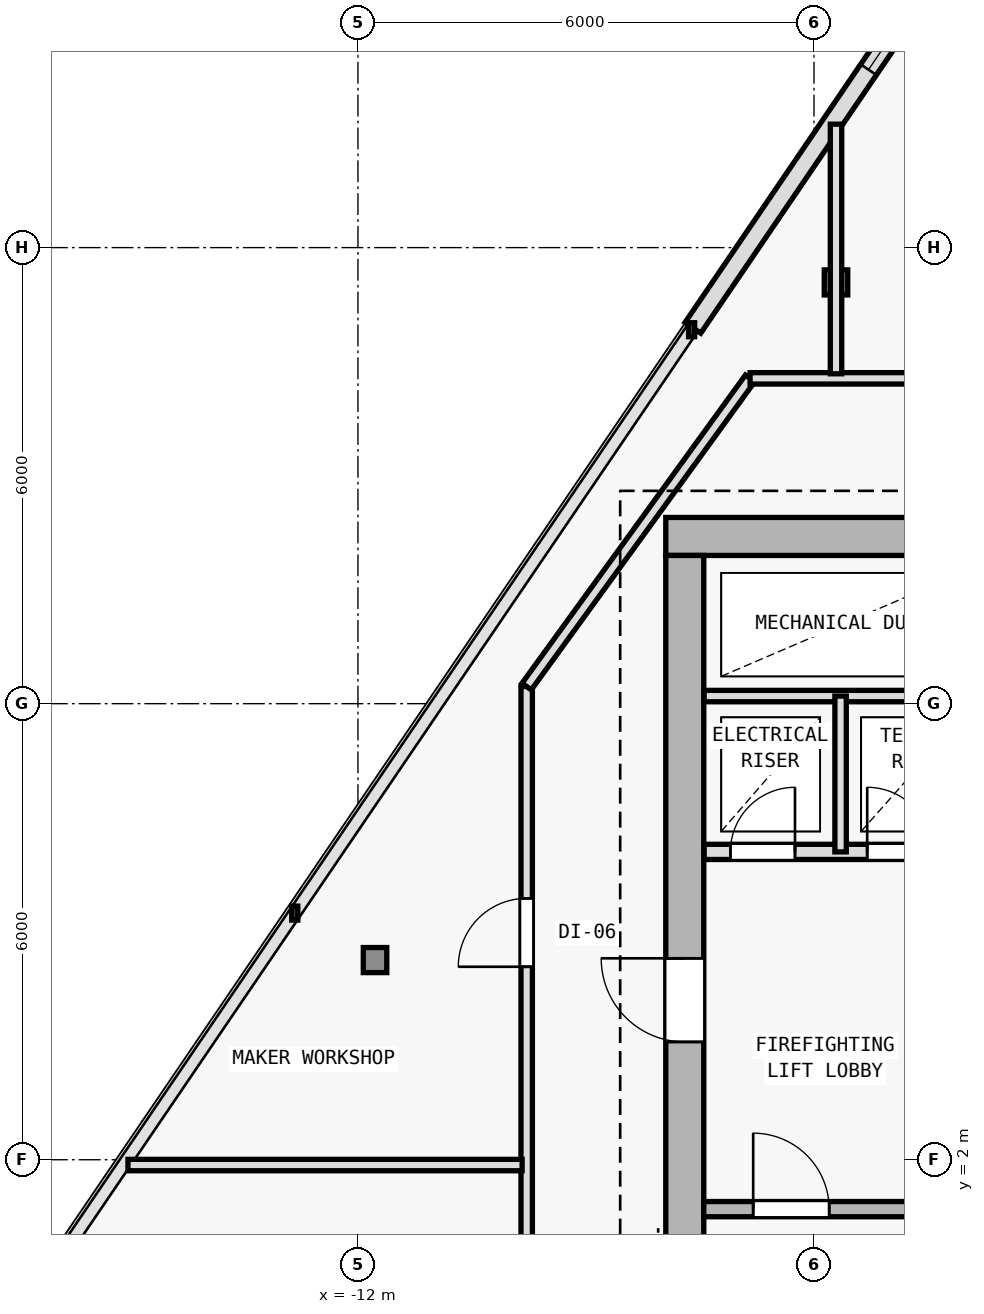
"""IFC4 building model, lengths in metres.
Left out: names, types, materials, properties, quantities, classifications, styles, units other than length and angle.
Written with IfcOpenShell. Run it as: python <this file> out.ifc"""

import sys

from ifc_helpers import new_model, si_unit, direction, frame, frame_2d, origin, origin_2d, place, context, subcontext, project, spatial, rectangle, i_section, extrude, element, fill, save


model = new_model("IFC4")
c1 = context("Model", 3, precision=1e-05, world=origin(), true_north=direction((0.0, 1.0)))
c2 = subcontext(c1, "Body", "Model", "MODEL_VIEW")
j1 = project(units=[si_unit("LENGTHUNIT", "METRE"), si_unit("PLANEANGLEUNIT", "RADIAN")], contexts=[c1])
p1 = place(None, origin())
s1 = spatial("IfcSite", under=j1, at=p1, CompositionType="ELEMENT")
p2 = place(p1, origin())
s2 = spatial("IfcBuilding", under=s1, at=p2, CompositionType="ELEMENT")
p3 = place(p2, frame((0.0, 0.0, 294.0)))
s3 = spatial("IfcBuildingStorey", under=s2, at=p3, CompositionType="ELEMENT", Elevation=294.0)
for number, where, z_axis, x_axis in (
    (1, (-7.7, 10.2, 0.0), (0.0, 0.0, 1.0), (1.0, 0.0, 0.0)),
    (2, (-7.7, 2.0, 0.0), (0.0, 0.0, 1.0), (1.0, 0.0, 0.0)),
):
    element("IfcColumn", number, at=place(p3, frame(where, z_axis=z_axis, x_axis=x_axis)), inside=s3, PredefinedType="COLUMN", context=c2, shape_type="SweptSolid", body=[
        extrude(i_section(OverallWidth=0.374, OverallDepth=0.372, WebThickness=0.012, FlangeThickness=0.02, FilletRadius=0.015, at=origin_2d()), origin(), (0.0, 0.0, 1.0), 3.6),
    ])
for number, where, z_axis, x_axis in (
    (3, (-5.71, 13.542, 0.006), (0.0, 0.0, 1.0), (1.0, 0.0, 0.0)),
    (4, (-11.775, 4.627, 0.006), (0.0, 0.0, 1.0), (1.0, 0.0, 0.0)),
):
    element("IfcColumn", number, at=place(p3, frame(where, z_axis=z_axis, x_axis=x_axis)), inside=s3, PredefinedType="COLUMN", context=c2, shape_type="SweptSolid", body=[
        extrude(i_section(OverallWidth=0.309, OverallDepth=0.33, WebThickness=0.011, FlangeThickness=0.019, FilletRadius=0.027, at=origin_2d()), origin(), (0.0, 0.0, 1.0), 3.594),
    ])
p4 = place(p3, frame((-7.593, 12.945, 0.0), z_axis=(0.0, 0.0, 1.0), x_axis=(0.562476003565, 0.826813609838, 0.0)))
e5 = element("IfcWall", 5, at=p4, inside=s3, PredefinedType="SOLIDWALL", context=c2, shape_type="SweptSolid", body=[
    extrude(rectangle(XDim=9.816, YDim=0.25, at=frame_2d((4.908, 0.0))), origin(), (0.0, 0.0, 1.0), 3.34),
])
p5 = place(p4, frame((4.108, 0.0, 0.62)))
e6 = element("IfcOpeningElement", 6, at=p5, cuts=e5, PredefinedType="OPENING", context=c2, shape_type="SweptSolid", body=[
    extrude(rectangle(XDim=1.6, YDim=2.1, at=frame_2d((0.8, 1.05))), frame((0.0, 0.135, 0.0), z_axis=(0.0, -1.0, 0.0), x_axis=(1.0, 0.0, 0.0)), (0.0, 0.0, 1.0), 0.27),
])
p6 = place(p3, frame((7.95, 10.2, 0.0), z_axis=(0.0, 0.0, 1.0), x_axis=(-1.0, 0.0, 0.0)))
e7 = element("IfcWall", 7, at=p6, inside=s3, PredefinedType="SHEAR", context=c2, shape_type="SweptSolid", body=[
    extrude(rectangle(XDim=15.9, YDim=0.5, at=frame_2d((7.95, 0.0))), origin(), (0.0, 0.0, 1.0), 3.34),
])
p7 = place(p6, frame((4.4, 0.0, 0.0)))
e8 = element("IfcOpeningElement", 8, at=p7, cuts=e7, PredefinedType="OPENING", context=c2, shape_type="SweptSolid", body=[
    extrude(rectangle(XDim=1.1, YDim=2.15, at=frame_2d((0.55, 1.075))), frame((0.0, 0.26, 0.0), z_axis=(0.0, -1.0, 0.0), x_axis=(1.0, 0.0, 0.0)), (0.0, 0.0, 1.0), 0.52),
])
p8 = place(p3, frame((-7.7, -9.15, 0.0), z_axis=(0.0, 0.0, 1.0), x_axis=(0.0, 1.0, 0.0)))
e9 = element("IfcWall", 9, at=p8, inside=s3, PredefinedType="SHEAR", context=c2, shape_type="SweptSolid", body=[
    extrude(rectangle(XDim=19.1, YDim=0.5, at=frame_2d((9.55, 0.0))), origin(), (0.0, 0.0, 1.0), 3.34),
])
p9 = place(p8, frame((12.7, 0.0, 0.0)))
e10 = element("IfcOpeningElement", 10, at=p9, cuts=e9, PredefinedType="OPENING", context=c2, shape_type="SweptSolid", body=[
    extrude(rectangle(XDim=1.1, YDim=2.15, at=frame_2d((0.55, 1.075))), frame((0.0, 0.26, 0.0), z_axis=(0.0, -1.0, 0.0), x_axis=(1.0, 0.0, 0.0)), (0.0, 0.0, 1.0), 0.52),
])
p10 = place(p3, frame((-7.45, 1.35, 0.0), z_axis=(0.0, 0.0, 1.0), x_axis=(1.0, 0.0, 0.0)))
e11 = element("IfcWall", 11, at=p10, inside=s3, PredefinedType="SOLIDWALL", context=c2, shape_type="SweptSolid", body=[
    extrude(rectangle(XDim=3.4, YDim=0.2, at=frame_2d((1.7, 0.0))), origin(), (0.0, 0.0, 1.0), 3.34),
])
p11 = place(p10, frame((0.65, 0.0, 0.0)))
e12 = element("IfcOpeningElement", 12, at=p11, cuts=e11, PredefinedType="OPENING", context=c2, shape_type="SweptSolid", body=[
    extrude(rectangle(XDim=1.0, YDim=2.15, at=frame_2d((0.5, 1.075))), frame((0.0, 0.11, 0.0), z_axis=(0.0, -1.0, 0.0), x_axis=(1.0, 0.0, 0.0)), (0.0, 0.0, 1.0), 0.22),
])
p12 = place(p3, frame((-7.445, 6.05, 0.0), z_axis=(0.0, 0.0, 1.0), x_axis=(1.0, 0.0, 0.0)))
e13 = element("IfcWall", 13, at=p12, inside=s3, PredefinedType="SOLIDWALL", context=c2, shape_type="SweptSolid", body=[
    extrude(rectangle(XDim=3.595, YDim=0.2, at=frame_2d((1.797, 0.0))), origin(), (0.0, 0.0, 1.0), 3.34),
])
p13 = place(p12, frame((0.345, 0.0, 0.0)))
e14 = element("IfcOpeningElement", 14, at=p13, cuts=e13, PredefinedType="OPENING", context=c2, shape_type="SweptSolid", body=[
    extrude(rectangle(XDim=0.85, YDim=2.1, at=frame_2d((0.425, 1.05))), frame((0.0, 0.11, 0.0), z_axis=(0.0, -1.0, 0.0), x_axis=(1.0, 0.0, 0.0)), (0.0, 0.0, 1.0), 0.22),
])
p14 = place(p12, frame((2.145, 0.0, 0.0)))
e15 = element("IfcOpeningElement", 15, at=p14, cuts=e13, PredefinedType="OPENING", context=c2, shape_type="SweptSolid", body=[
    extrude(rectangle(XDim=0.85, YDim=2.1, at=frame_2d((0.425, 1.05))), frame((0.0, 0.11, 0.0), z_axis=(0.0, -1.0, 0.0), x_axis=(1.0, 0.0, 0.0)), (0.0, 0.0, 1.0), 0.22),
])
p15 = place(p3, frame((-7.445, 8.1, 0.0), z_axis=(0.0, 0.0, 1.0), x_axis=(1.0, 0.0, 0.0)))
e16 = element("IfcWall", 16, at=p15, inside=s3, PredefinedType="PARTITIONING", context=c2, shape_type="SweptSolid", body=[
    extrude(rectangle(XDim=3.595, YDim=0.15, at=frame_2d((1.797, 0.0))), origin(), (0.0, 0.0, 1.0), 3.34),
])
p16 = place(p3, frame((-5.65, 6.05, 0.0), z_axis=(0.0, 0.0, 1.0), x_axis=(0.0, 1.0, 0.0)))
e17 = element("IfcWall", 17, at=p16, inside=s3, PredefinedType="PARTITIONING", context=c2, shape_type="SweptSolid", body=[
    extrude(rectangle(XDim=2.05, YDim=0.15, at=frame_2d((1.025, 0.0))), origin(), (0.0, 0.0, 1.0), 3.34),
])
p17 = place(p3, frame((-9.78, -11.48, 0.0), z_axis=(0.0, 0.0, 1.0), x_axis=(0.0, 1.0, 0.0)))
e18 = element("IfcWall", 18, at=p17, inside=s3, PredefinedType="PARTITIONING", context=c2, shape_type="SweptSolid", body=[
    extrude(rectangle(XDim=19.706, YDim=0.15, at=frame_2d((9.853, 0.0))), origin(), (0.0, 0.0, 1.0), 2.915),
])
p18 = place(p17, frame((9.851, 0.0, 0.0)))
e19 = element("IfcOpeningElement", 19, at=p18, cuts=e18, PredefinedType="OPENING", context=c2, shape_type="SweptSolid", body=[
    extrude(rectangle(XDim=0.9, YDim=2.1, at=frame_2d((0.45, 1.05))), frame((0.0, 0.085, 0.0), z_axis=(0.0, -1.0, 0.0), x_axis=(1.0, 0.0, 0.0)), (0.0, 0.0, 1.0), 0.17),
])
p19 = place(p17, frame((5.939, 0.0, 0.0)))
e20 = element("IfcOpeningElement", 20, at=p19, cuts=e18, PredefinedType="OPENING", context=c2, shape_type="SweptSolid", body=[
    extrude(rectangle(XDim=0.85, YDim=2.1, at=frame_2d((0.425, 1.05))), frame((0.0, 0.085, 0.0), z_axis=(0.0, -1.0, 0.0), x_axis=(1.0, 0.0, 0.0)), (0.0, 0.0, 1.0), 0.17),
])
p20 = place(p17, frame((4.408, 0.0, 0.0)))
e21 = element("IfcOpeningElement", 21, at=p20, cuts=e18, PredefinedType="OPENING", context=c2, shape_type="SweptSolid", body=[
    extrude(rectangle(XDim=0.85, YDim=2.1, at=frame_2d((0.425, 1.05))), frame((0.0, 0.085, 0.0), z_axis=(0.0, -1.0, 0.0), x_axis=(1.0, 0.0, 0.0)), (0.0, 0.0, 1.0), 0.17),
])
p21 = place(p17, frame((2.693, 0.0, 0.0)))
e22 = element("IfcOpeningElement", 22, at=p21, cuts=e18, PredefinedType="OPENING", context=c2, shape_type="SweptSolid", body=[
    extrude(rectangle(XDim=0.9, YDim=2.1, at=frame_2d((0.45, 1.05))), frame((0.0, 0.085, 0.0), z_axis=(0.0, -1.0, 0.0), x_axis=(1.0, 0.0, 0.0)), (0.0, 0.0, 1.0), 0.17),
])
p22 = place(p17, frame((0.718, 0.0, 0.0)))
e23 = element("IfcOpeningElement", 23, at=p22, cuts=e18, PredefinedType="OPENING", context=c2, shape_type="SweptSolid", body=[
    extrude(rectangle(XDim=0.9, YDim=2.1, at=frame_2d((0.45, 1.05))), frame((0.0, 0.085, 0.0), z_axis=(0.0, -1.0, 0.0), x_axis=(1.0, 0.0, 0.0)), (0.0, 0.0, 1.0), 0.17),
])
p23 = place(p17, frame((16.019, 0.0, 0.0)))
e24 = element("IfcOpeningElement", 24, at=p23, cuts=e18, PredefinedType="OPENING", context=c2, shape_type="SweptSolid", body=[
    extrude(rectangle(XDim=0.9, YDim=2.1, at=frame_2d((0.45, 1.05))), frame((0.0, 0.085, 0.0), z_axis=(0.0, -1.0, 0.0), x_axis=(1.0, 0.0, 0.0)), (0.0, 0.0, 1.0), 0.17),
])
p24 = place(p3, frame((-9.78, 8.226, 0.0), z_axis=(0.0, 0.0, 1.0), x_axis=(0.586956386413, 0.809618552436, 0.0)))
e25 = element("IfcWall", 25, at=p24, inside=s3, PredefinedType="PARTITIONING", context=c2, shape_type="SweptSolid", body=[
    extrude(rectangle(XDim=5.008, YDim=0.15, at=frame_2d((2.504, 0.0))), origin(), (0.0, 0.0, 1.0), 3.005),
])
p25 = place(p3, frame((-6.841, 12.28, 0.0), z_axis=(0.0, 0.0, 1.0), x_axis=(1.0, 0.0, 0.0)))
e26 = element("IfcWall", 26, at=p25, inside=s3, PredefinedType="PARTITIONING", context=c2, shape_type="SweptSolid", body=[
    extrude(rectangle(XDim=13.682, YDim=0.15, at=frame_2d((6.841, 0.0))), origin(), (0.0, 0.0, 1.0), 3.005),
])
p26 = place(p25, frame((12.421, 0.0, 0.0)))
e27 = element("IfcOpeningElement", 27, at=p26, cuts=e26, PredefinedType="OPENING", context=c2, shape_type="SweptSolid", body=[
    extrude(rectangle(XDim=0.85, YDim=2.1, at=frame_2d((0.425, 1.05))), frame((0.0, 0.085, 0.0), z_axis=(0.0, -1.0, 0.0), x_axis=(1.0, 0.0, 0.0)), (0.0, 0.0, 1.0), 0.17),
])
p27 = place(p25, frame((10.304, 0.0, 0.0)))
e28 = element("IfcOpeningElement", 28, at=p27, cuts=e26, PredefinedType="OPENING", context=c2, shape_type="SweptSolid", body=[
    extrude(rectangle(XDim=0.9, YDim=2.1, at=frame_2d((0.45, 1.05))), frame((0.0, 0.085, 0.0), z_axis=(0.0, -1.0, 0.0), x_axis=(1.0, 0.0, 0.0)), (0.0, 0.0, 1.0), 0.17),
])
p28 = place(p25, frame((6.797, 0.0, 0.0)))
e29 = element("IfcOpeningElement", 29, at=p28, cuts=e26, PredefinedType="OPENING", context=c2, shape_type="SweptSolid", body=[
    extrude(rectangle(XDim=0.9, YDim=2.1, at=frame_2d((0.45, 1.05))), frame((0.0, 0.085, 0.0), z_axis=(0.0, -1.0, 0.0), x_axis=(1.0, 0.0, 0.0)), (0.0, 0.0, 1.0), 0.17),
])
p29 = place(p25, frame((2.727, 0.0, 0.0)))
e30 = element("IfcOpeningElement", 30, at=p29, cuts=e26, PredefinedType="OPENING", context=c2, shape_type="SweptSolid", body=[
    extrude(rectangle(XDim=0.9, YDim=2.1, at=frame_2d((0.45, 1.05))), frame((0.0, 0.085, 0.0), z_axis=(0.0, -1.0, 0.0), x_axis=(1.0, 0.0, 0.0)), (0.0, 0.0, 1.0), 0.17),
])
p30 = place(p3, frame((-5.71, 12.34, 0.0), z_axis=(0.0, 0.0, 1.0), x_axis=(0.0, 1.0, 0.0)))
e31 = element("IfcWall", 31, at=p30, inside=s3, PredefinedType="PARTITIONING", context=c2, shape_type="SweptSolid", body=[
    extrude(rectangle(XDim=3.284, YDim=0.15, at=frame_2d((1.642, 0.0))), origin(), (0.0, 0.0, 1.0), 3.005),
])
p31 = place(p3, frame((-9.84, 1.93, 0.0), z_axis=(0.0, 0.0, 1.0), x_axis=(-1.0, 0.0, 0.0)))
e32 = element("IfcWall", 32, at=p31, inside=s3, PredefinedType="PARTITIONING", context=c2, shape_type="SweptSolid", body=[
    extrude(rectangle(XDim=5.186, YDim=0.15, at=frame_2d((2.593, 0.0))), origin(), (0.0, 0.0, 1.0), 3.005),
])
p32 = place(p5, origin())
e33 = element("IfcWindow", 33, at=p32, inside=s3, PartitioningType="SINGLE_PANEL", PredefinedType="WINDOW", context=c2, shape_type="SweptSolid", body=[
    extrude(rectangle(XDim=1.6, YDim=2.1, at=frame_2d((0.8, 1.05))), frame((0.0, 0.03, 0.0), z_axis=(0.0, -1.0, 0.0), x_axis=(1.0, 0.0, 0.0)), (0.0, 0.0, 1.0), 0.06),
])
fill(e6, e33)
p33 = place(p9, origin())
e34 = element("IfcDoor", 34, at=p33, inside=s3, OperationType="SINGLE_SWING_RIGHT", PredefinedType="DOOR", context=c2, shape_type="SweptSolid", body=[
    extrude(rectangle(XDim=1.1, YDim=2.15, at=frame_2d((0.55, 1.075))), frame((0.0, 0.025, 0.0), z_axis=(0.0, -1.0, 0.0), x_axis=(1.0, 0.0, 0.0)), (0.0, 0.0, 1.0), 0.05),
])
fill(e10, e34)
p34 = place(p11, origin())
e35 = element("IfcDoor", 35, at=p34, inside=s3, OperationType="SINGLE_SWING_LEFT", PredefinedType="DOOR", context=c2, shape_type="SweptSolid", body=[
    extrude(rectangle(XDim=1.0, YDim=2.15, at=frame_2d((0.5, 1.075))), frame((0.0, 0.025, 0.0), z_axis=(0.0, -1.0, 0.0), x_axis=(1.0, 0.0, 0.0)), (0.0, 0.0, 1.0), 0.05),
])
fill(e12, e35)
p35 = place(p13, origin())
e36 = element("IfcDoor", 36, at=p35, inside=s3, OperationType="SINGLE_SWING_RIGHT", PredefinedType="DOOR", context=c2, shape_type="SweptSolid", body=[
    extrude(rectangle(XDim=0.85, YDim=2.1, at=frame_2d((0.425, 1.05))), frame((0.0, 0.025, 0.0), z_axis=(0.0, -1.0, 0.0), x_axis=(1.0, 0.0, 0.0)), (0.0, 0.0, 1.0), 0.05),
])
fill(e14, e36)
p36 = place(p14, origin())
e37 = element("IfcDoor", 37, at=p36, inside=s3, OperationType="SINGLE_SWING_LEFT", PredefinedType="DOOR", context=c2, shape_type="SweptSolid", body=[
    extrude(rectangle(XDim=0.85, YDim=2.1, at=frame_2d((0.425, 1.05))), frame((0.0, 0.025, 0.0), z_axis=(0.0, -1.0, 0.0), x_axis=(1.0, 0.0, 0.0)), (0.0, 0.0, 1.0), 0.05),
])
fill(e15, e37)
p37 = place(p23, origin())
e38 = element("IfcDoor", 38, at=p37, inside=s3, OperationType="SINGLE_SWING_LEFT", PredefinedType="DOOR", context=c2, shape_type="SweptSolid", body=[
    extrude(rectangle(XDim=0.9, YDim=2.1, at=frame_2d((0.45, 1.05))), frame((0.0, 0.025, 0.0), z_axis=(0.0, -1.0, 0.0), x_axis=(1.0, 0.0, 0.0)), (0.0, 0.0, 1.0), 0.05),
])
fill(e24, e38)
save(model, sys.argv[1])
